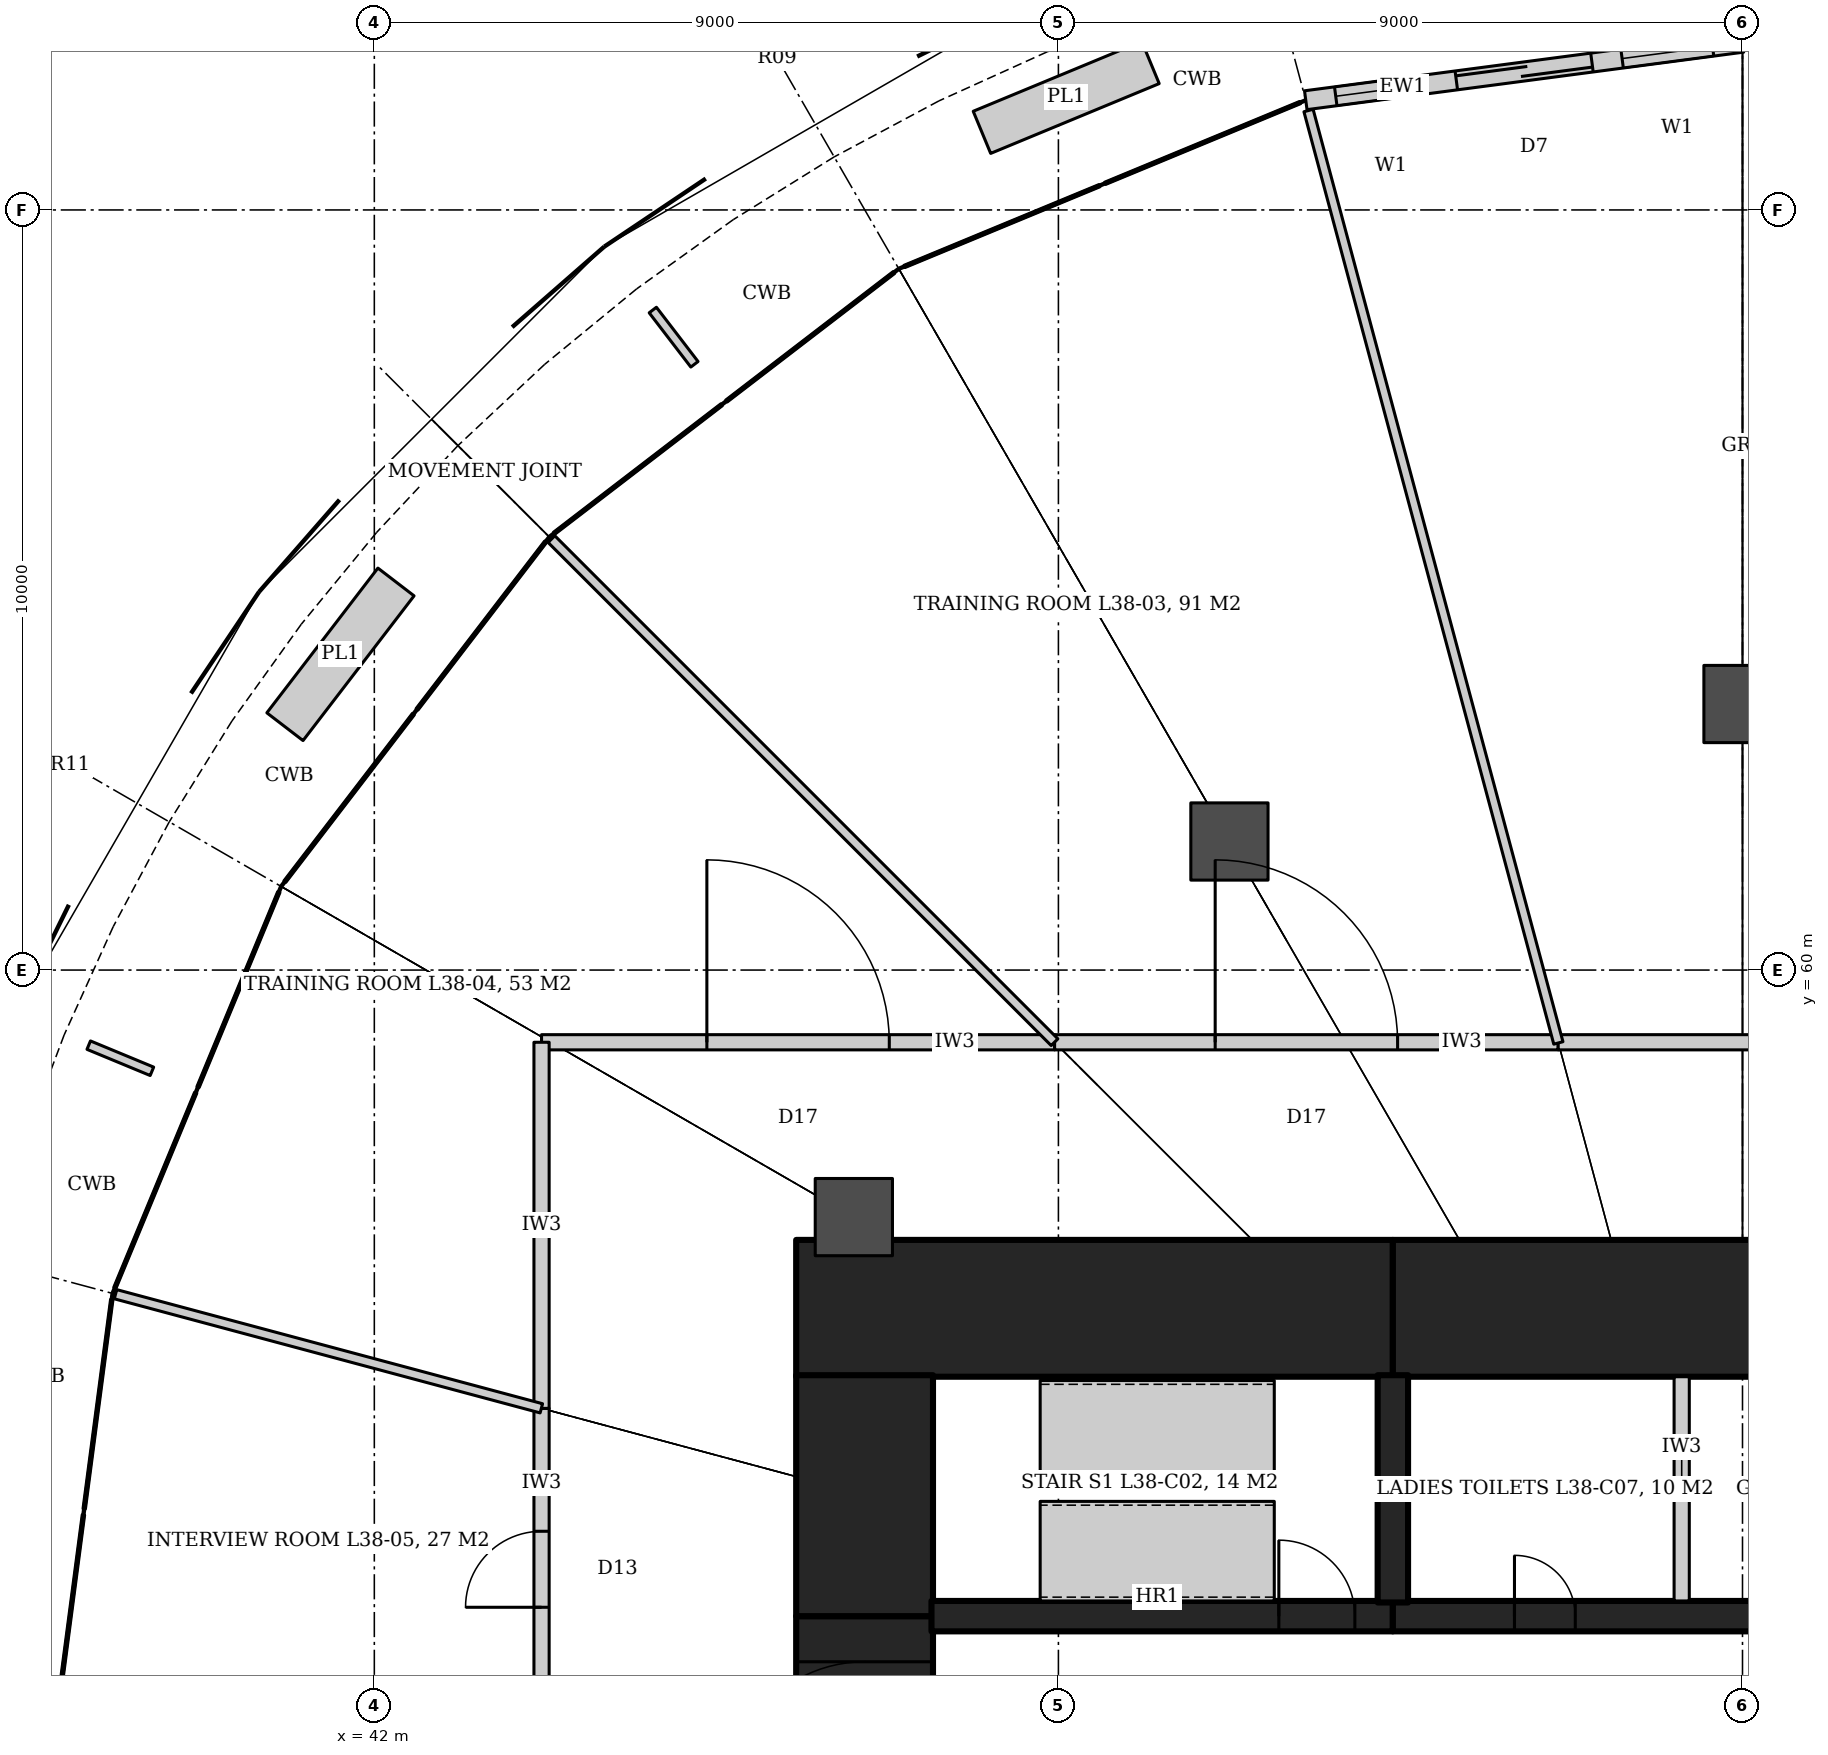
"""IFC4 building model, lengths in metres.
Left out: names, types, materials, properties, quantities, classifications, styles, units other than length and angle.
Written with IfcOpenShell. Run it as: python <this file> out.ifc"""

import sys

from ifc_helpers import new_model, si_unit, direction, frame, frame_2d, origin, origin_2d, place, context, subcontext, project, spatial, rectangle, hollow_circle, extrude, element, fill, save


model = new_model("IFC4")
c1 = context("Model", 3, precision=1e-05, world=origin(), true_north=direction((0.0, 1.0)))
c2 = subcontext(c1, "Body", "Model", "MODEL_VIEW")
j1 = project(units=[si_unit("LENGTHUNIT", "METRE"), si_unit("PLANEANGLEUNIT", "RADIAN")], contexts=[c1])
p1 = place(None, origin())
s1 = spatial("IfcSite", under=j1, at=p1, CompositionType="ELEMENT")
p2 = place(p1, origin())
s2 = spatial("IfcBuilding", under=s1, at=p2, CompositionType="ELEMENT")
p3 = place(p2, frame((0.0, 0.0, 160.4)))
s3 = spatial("IfcBuildingStorey", under=s2, at=p3, CompositionType="ELEMENT", Elevation=160.4)
p4 = place(p3, frame((47.55, 55.55, 0.0), z_axis=(0.0, 0.0, 1.0), x_axis=(1.0, 0.0, 0.0)))
e1 = element("IfcWall", 1, at=p4, inside=s3, PredefinedType="SHEAR", context=c2, shape_type="SweptSolid", body=[
    extrude(rectangle(XDim=7.85, YDim=1.8, at=frame_2d((3.925, 0.0))), origin(), (0.0, 0.0, 1.0), 4.2),
])
p5 = place(p3, frame((55.4, 55.55, 0.0), z_axis=(0.0, 0.0, 1.0), x_axis=(1.0, 0.0, 0.0)))
e2 = element("IfcWall", 2, at=p5, inside=s3, PredefinedType="SHEAR", context=c2, shape_type="SweptSolid", body=[
    extrude(rectangle(XDim=9.2, YDim=1.8, at=frame_2d((4.6, 0.0))), origin(), (0.0, 0.0, 1.0), 4.2),
])
p6 = place(p3, frame((48.45, 48.5, 0.0), z_axis=(0.0, 0.0, 1.0), x_axis=(0.0, 1.0, 0.0)))
e3 = element("IfcWall", 3, at=p6, inside=s3, PredefinedType="SHEAR", context=c2, shape_type="SweptSolid", body=[
    extrude(rectangle(XDim=3.0, YDim=1.8, at=frame_2d((1.5, 0.0))), origin(), (0.0, 0.0, 1.0), 4.2),
])
p7 = place(p6, frame((0.6, 0.0, 0.0)))
e4 = element("IfcOpeningElement", 4, at=p7, cuts=e3, PredefinedType="OPENING", context=c2, shape_type="SweptSolid", body=[
    extrude(rectangle(XDim=1.8, YDim=2.1, at=frame_2d((0.9, 1.05))), frame((0.0, 0.91, 0.0), z_axis=(0.0, -1.0, 0.0), x_axis=(1.0, 0.0, 0.0)), (0.0, 0.0, 1.0), 1.82),
])
p8 = place(p3, frame((48.45, 51.5, 0.0), z_axis=(0.0, 0.0, 1.0), x_axis=(0.0, 1.0, 0.0)))
e5 = element("IfcWall", 5, at=p8, inside=s3, PredefinedType="SHEAR", context=c2, shape_type="SweptSolid", body=[
    extrude(rectangle(XDim=3.17, YDim=1.8, at=frame_2d((1.585, 0.0))), origin(), (0.0, 0.0, 1.0), 4.2),
])
p9 = place(p3, frame((49.33, 51.5, 0.0), z_axis=(0.0, 0.0, 1.0), x_axis=(1.0, 0.0, 0.0)))
e6 = element("IfcWall", 6, at=p9, inside=s3, PredefinedType="SHEAR", context=c2, shape_type="SweptSolid", body=[
    extrude(rectangle(XDim=6.07, YDim=0.4, at=frame_2d((3.035, 0.0))), origin(), (0.0, 0.0, 1.0), 4.2),
])
p10 = place(p9, frame((4.57, 0.0, 0.0)))
e7 = element("IfcOpeningElement", 7, at=p10, cuts=e6, PredefinedType="OPENING", context=c2, shape_type="SweptSolid", body=[
    extrude(rectangle(XDim=1.0, YDim=2.1, at=frame_2d((0.5, 1.05))), frame((0.0, 0.21, 0.0), z_axis=(0.0, -1.0, 0.0), x_axis=(1.0, 0.0, 0.0)), (0.0, 0.0, 1.0), 0.42),
])
p11 = place(p3, frame((55.4, 51.5, 0.0), z_axis=(0.0, 0.0, 1.0), x_axis=(1.0, 0.0, 0.0)))
e8 = element("IfcWall", 8, at=p11, inside=s3, PredefinedType="SHEAR", context=c2, shape_type="SweptSolid", body=[
    extrude(rectangle(XDim=9.2, YDim=0.4, at=frame_2d((4.6, 0.0))), origin(), (0.0, 0.0, 1.0), 4.2),
])
p12 = place(p11, frame((1.6, 0.0, 0.0)))
e9 = element("IfcOpeningElement", 9, at=p12, cuts=e8, PredefinedType="OPENING", context=c2, shape_type="SweptSolid", body=[
    extrude(rectangle(XDim=0.8, YDim=2.1, at=frame_2d((0.4, 1.05))), frame((0.0, 0.21, 0.0), z_axis=(0.0, -1.0, 0.0), x_axis=(1.0, 0.0, 0.0)), (0.0, 0.0, 1.0), 0.42),
])
p13 = place(p11, frame((4.7, 0.0, 0.0)))
e10 = element("IfcOpeningElement", 10, at=p13, cuts=e8, PredefinedType="OPENING", context=c2, shape_type="SweptSolid", body=[
    extrude(rectangle(XDim=0.8, YDim=2.1, at=frame_2d((0.4, 1.05))), frame((0.0, 0.21, 0.0), z_axis=(0.0, -1.0, 0.0), x_axis=(1.0, 0.0, 0.0)), (0.0, 0.0, 1.0), 0.42),
])
p14 = place(p11, frame((7.3, 0.0, 0.0)))
e11 = element("IfcOpeningElement", 11, at=p14, cuts=e8, PredefinedType="OPENING", context=c2, shape_type="SweptSolid", body=[
    extrude(rectangle(XDim=0.8, YDim=2.1, at=frame_2d((0.4, 1.05))), frame((0.0, 0.21, 0.0), z_axis=(0.0, -1.0, 0.0), x_axis=(1.0, 0.0, 0.0)), (0.0, 0.0, 1.0), 0.42),
])
p15 = place(p3, frame((55.4, 51.68, 0.0), z_axis=(0.0, 0.0, 1.0), x_axis=(0.0, 1.0, 0.0)))
e12 = element("IfcWall", 12, at=p15, inside=s3, PredefinedType="SHEAR", context=c2, shape_type="SweptSolid", body=[
    extrude(rectangle(XDim=2.99, YDim=0.4, at=frame_2d((1.495, 0.0))), origin(), (0.0, 0.0, 1.0), 4.2),
])
for number, where, z_axis, x_axis in (
    (13, (60.0, 63.5, 0.0), (0.0, 0.0, 1.0), (1.0, 0.0, 0.0)),
    (14, (53.25, 61.691, 0.0), (0.0, 0.0, 1.0), (1.0, 0.0, 0.0)),
    (15, (48.309, 56.75, 0.0), (0.0, 0.0, 1.0), (1.0, 0.0, 0.0)),
):
    element("IfcColumn", number, at=place(p3, frame(where, z_axis=z_axis, x_axis=x_axis)), inside=s3, PredefinedType="COLUMN", context=c2, shape_type="SweptSolid", body=[
        extrude(hollow_circle(Radius=0.508, WallThickness=0.05, at=origin_2d()), origin(), (0.0, 0.0, 1.0), 4.2),
    ])
p16 = place(p3, frame((44.2, 59.05, 0.0), z_axis=(0.0, 0.0, 1.0), x_axis=(1.0, 0.0, 0.0)))
e16 = element("IfcWall", 16, at=p16, inside=s3, PredefinedType="PARTITIONING", context=c2, shape_type="SweptSolid", body=[
    extrude(rectangle(XDim=6.75, YDim=0.2, at=frame_2d((3.375, 0.0))), origin(), (0.0, 0.0, 1.0), 3.012),
])
p17 = place(p16, frame((2.175, 0.0, 0.0)))
e17 = element("IfcOpeningElement", 17, at=p17, cuts=e16, PredefinedType="OPENING", context=c2, shape_type="SweptSolid", body=[
    extrude(rectangle(XDim=2.4, YDim=2.4, at=frame_2d((1.2, 1.2))), frame((0.0, 0.11, 0.0), z_axis=(0.0, -1.0, 0.0), x_axis=(1.0, 0.0, 0.0)), (0.0, 0.0, 1.0), 0.22),
])
p18 = place(p3, frame((50.95, 59.05, 0.0), z_axis=(0.0, 0.0, 1.0), x_axis=(1.0, 0.0, 0.0)))
e18 = element("IfcWall", 18, at=p18, inside=s3, PredefinedType="PARTITIONING", context=c2, shape_type="SweptSolid", body=[
    extrude(rectangle(XDim=6.625, YDim=0.2, at=frame_2d((3.312, 0.0))), origin(), (0.0, 0.0, 1.0), 3.02),
])
p19 = place(p18, frame((2.113, 0.0, 0.0)))
e19 = element("IfcOpeningElement", 19, at=p19, cuts=e18, PredefinedType="OPENING", context=c2, shape_type="SweptSolid", body=[
    extrude(rectangle(XDim=2.4, YDim=2.4, at=frame_2d((1.2, 1.2))), frame((0.0, 0.11, 0.0), z_axis=(0.0, -1.0, 0.0), x_axis=(1.0, 0.0, 0.0)), (0.0, 0.0, 1.0), 0.22),
])
p20 = place(p3, frame((57.575, 59.05, 0.0), z_axis=(0.0, 0.0, 1.0), x_axis=(1.0, 0.0, 0.0)))
e20 = element("IfcWall", 20, at=p20, inside=s3, PredefinedType="PARTITIONING", context=c2, shape_type="SweptSolid", body=[
    extrude(rectangle(XDim=18.225, YDim=0.2, at=frame_2d((9.112, 0.0))), origin(), (0.0, 0.0, 1.0), 3.012),
])
p21 = place(p20, frame((8.113, 0.0, 0.0)))
e21 = element("IfcOpeningElement", 21, at=p21, cuts=e20, PredefinedType="OPENING", context=c2, shape_type="SweptSolid", body=[
    extrude(rectangle(XDim=2.0, YDim=2.1, at=frame_2d((1.0, 1.05))), frame((0.0, 0.11, 0.0), z_axis=(0.0, -1.0, 0.0), x_axis=(1.0, 0.0, 0.0)), (0.0, 0.0, 1.0), 0.22),
])
p22 = place(p3, frame((44.2, 50.0, 0.0), z_axis=(0.0, 0.0, 1.0), x_axis=(0.0, 1.0, 0.0)))
e22 = element("IfcWall", 22, at=p22, inside=s3, PredefinedType="PARTITIONING", context=c2, shape_type="SweptSolid", body=[
    extrude(rectangle(XDim=4.234, YDim=0.2, at=frame_2d((2.117, 0.0))), origin(), (0.0, 0.0, 1.0), 3.012),
])
p23 = place(p22, frame((1.617, 0.0, 0.0)))
e23 = element("IfcOpeningElement", 23, at=p23, cuts=e22, PredefinedType="OPENING", context=c2, shape_type="SweptSolid", body=[
    extrude(rectangle(XDim=1.0, YDim=2.4, at=frame_2d((0.5, 1.2))), frame((0.0, 0.11, 0.0), z_axis=(0.0, -1.0, 0.0), x_axis=(1.0, 0.0, 0.0)), (0.0, 0.0, 1.0), 0.22),
])
p24 = place(p3, frame((44.2, 54.234, 0.0), z_axis=(0.0, 0.0, 1.0), x_axis=(0.0, 1.0, 0.0)))
e24 = element("IfcWall", 24, at=p24, inside=s3, PredefinedType="PARTITIONING", context=c2, shape_type="SweptSolid", body=[
    extrude(rectangle(XDim=4.816, YDim=0.2, at=frame_2d((2.408, 0.0))), origin(), (0.0, 0.0, 1.0), 3.012),
])
p25 = place(p3, frame((57.577, 59.041, 0.0), z_axis=(0.0, 0.0, 1.0), x_axis=(-0.258810449587, 0.96592812941, 0.0)))
e25 = element("IfcWall", 25, at=p25, inside=s3, PredefinedType="PARTITIONING", context=c2, shape_type="SweptSolid", body=[
    extrude(rectangle(XDim=12.8, YDim=0.125, at=frame_2d((6.4, 0.0))), origin(), (0.0, 0.0, 1.0), 3.012),
])
p26 = place(p3, frame((50.949, 59.051, 0.0), z_axis=(0.0, 0.0, 1.0), x_axis=(-0.707106781187, 0.707106781187, 0.0)))
e26 = element("IfcWall", 26, at=p26, inside=s3, PredefinedType="PARTITIONING", context=c2, shape_type="SweptSolid", body=[
    extrude(rectangle(XDim=5.86, YDim=0.125, at=frame_2d((2.93, 0.0))), origin(), (0.0, 0.0, 1.0), 3.012),
])
p27 = place(p3, frame((44.198, 54.234, 0.0), z_axis=(0.0, 0.0, 1.0), x_axis=(-0.965933460469, 0.258790552276, 0.0)))
e27 = element("IfcWall", 27, at=p27, inside=s3, PredefinedType="PARTITIONING", context=c2, shape_type="SweptSolid", body=[
    extrude(rectangle(XDim=5.9, YDim=0.125, at=frame_2d((2.95, 0.0))), origin(), (0.0, 0.0, 1.0), 3.012),
])
p28 = place(p3, frame((60.0, 72.3, 0.0), z_axis=(0.0, 0.0, 1.0), x_axis=(-0.99144158687, -0.130551062135, 0.0)))
e28 = element("IfcWall", 28, at=p28, inside=s3, PredefinedType="SOLIDWALL", context=c2, shape_type="SweptSolid", body=[
    extrude(rectangle(XDim=5.822, YDim=0.25, at=frame_2d((2.911, 0.0))), origin(), (0.0, 0.0, 1.0), 4.04),
])
p29 = place(p28, frame((2.011, 0.0, 0.0)))
e29 = element("IfcOpeningElement", 29, at=p29, cuts=e28, PredefinedType="OPENING", context=c2, shape_type="SweptSolid", body=[
    extrude(rectangle(XDim=1.8, YDim=2.4, at=frame_2d((0.9, 1.2))), frame((0.0, 0.135, 0.0), z_axis=(0.0, -1.0, 0.0), x_axis=(1.0, 0.0, 0.0)), (0.0, 0.0, 1.0), 0.27),
])
p30 = place(p28, frame((0.411, 0.0, 0.0)))
e30 = element("IfcOpeningElement", 30, at=p30, cuts=e28, PredefinedType="OPENING", context=c2, shape_type="SweptSolid", body=[
    extrude(rectangle(XDim=1.2, YDim=2.4, at=frame_2d((0.6, 1.2))), frame((0.0, 0.135, 0.0), z_axis=(0.0, -1.0, 0.0), x_axis=(1.0, 0.0, 0.0)), (0.0, 0.0, 1.0), 0.27),
])
p31 = place(p28, frame((4.211, 0.0, 0.0)))
e31 = element("IfcOpeningElement", 31, at=p31, cuts=e28, PredefinedType="OPENING", context=c2, shape_type="SweptSolid", body=[
    extrude(rectangle(XDim=1.2, YDim=2.4, at=frame_2d((0.6, 1.2))), frame((0.0, 0.135, 0.0), z_axis=(0.0, -1.0, 0.0), x_axis=(1.0, 0.0, 0.0)), (0.0, 0.0, 1.0), 0.27),
])
p32 = place(p3, frame((59.2, 51.7, 0.0), z_axis=(0.0, 0.0, 1.0), x_axis=(0.0, 1.0, 0.0)))
e32 = element("IfcWall", 32, at=p32, inside=s3, PredefinedType="PARTITIONING", context=c2, shape_type="SweptSolid", body=[
    extrude(rectangle(XDim=2.95, YDim=0.2, at=frame_2d((1.475, 0.0))), origin(), (0.0, 0.0, 1.0), 4.04),
])
p33 = place(p19, origin())
e33 = element("IfcDoor", 33, at=p33, inside=s3, OperationType="DOUBLE_DOOR_DOUBLE_SWING", PredefinedType="DOOR", context=c2, shape_type="SweptSolid", body=[
    extrude(rectangle(XDim=2.4, YDim=2.4, at=frame_2d((1.2, 1.2))), frame((0.0, 0.025, 0.0), z_axis=(0.0, -1.0, 0.0), x_axis=(1.0, 0.0, 0.0)), (0.0, 0.0, 1.0), 0.05),
])
fill(e19, e33)
p34 = place(p17, origin())
e34 = element("IfcDoor", 34, at=p34, inside=s3, OperationType="DOUBLE_DOOR_DOUBLE_SWING", PredefinedType="DOOR", context=c2, shape_type="SweptSolid", body=[
    extrude(rectangle(XDim=2.4, YDim=2.4, at=frame_2d((1.2, 1.2))), frame((0.0, 0.025, 0.0), z_axis=(0.0, -1.0, 0.0), x_axis=(1.0, 0.0, 0.0)), (0.0, 0.0, 1.0), 0.05),
])
fill(e17, e34)
p35 = place(p23, origin())
e35 = element("IfcDoor", 35, at=p35, inside=s3, OperationType="SINGLE_SWING_LEFT", PredefinedType="DOOR", context=c2, shape_type="SweptSolid", body=[
    extrude(rectangle(XDim=1.0, YDim=2.4, at=frame_2d((0.5, 1.2))), frame((0.0, 0.025, 0.0), z_axis=(0.0, -1.0, 0.0), x_axis=(1.0, 0.0, 0.0)), (0.0, 0.0, 1.0), 0.05),
])
fill(e23, e35)
p36 = place(p29, origin())
e36 = element("IfcDoor", 36, at=p36, inside=s3, OperationType="DOUBLE_DOOR_SLIDING", PredefinedType="DOOR", context=c2, shape_type="SweptSolid", body=[
    extrude(rectangle(XDim=1.8, YDim=2.4, at=frame_2d((0.9, 1.2))), frame((0.0, 0.025, 0.0), z_axis=(0.0, -1.0, 0.0), x_axis=(1.0, 0.0, 0.0)), (0.0, 0.0, 1.0), 0.05),
])
fill(e29, e36)
p37 = place(p30, origin())
e37 = element("IfcWindow", 37, at=p37, inside=s3, PartitioningType="SINGLE_PANEL", PredefinedType="WINDOW", context=c2, shape_type="SweptSolid", body=[
    extrude(rectangle(XDim=1.2, YDim=2.4, at=frame_2d((0.6, 1.2))), frame((0.0, 0.03, 0.0), z_axis=(0.0, -1.0, 0.0), x_axis=(1.0, 0.0, 0.0)), (0.0, 0.0, 1.0), 0.06),
])
fill(e30, e37)
p38 = place(p31, origin())
e38 = element("IfcWindow", 38, at=p38, inside=s3, PartitioningType="SINGLE_PANEL", PredefinedType="WINDOW", context=c2, shape_type="SweptSolid", body=[
    extrude(rectangle(XDim=1.2, YDim=2.4, at=frame_2d((0.6, 1.2))), frame((0.0, 0.03, 0.0), z_axis=(0.0, -1.0, 0.0), x_axis=(1.0, 0.0, 0.0)), (0.0, 0.0, 1.0), 0.06),
])
fill(e31, e38)
p39 = place(p10, origin())
e39 = element("IfcDoor", 39, at=p39, inside=s3, OperationType="SINGLE_SWING_LEFT", PredefinedType="DOOR", context=c2, shape_type="SweptSolid", body=[
    extrude(rectangle(XDim=1.0, YDim=2.1, at=frame_2d((0.5, 1.05))), frame((0.0, 0.025, 0.0), z_axis=(0.0, -1.0, 0.0), x_axis=(1.0, 0.0, 0.0)), (0.0, 0.0, 1.0), 0.05),
])
fill(e7, e39)
p40 = place(p7, origin())
e40 = element("IfcDoor", 40, at=p40, inside=s3, OperationType="DOUBLE_DOOR_DOUBLE_SWING", PredefinedType="DOOR", context=c2, shape_type="SweptSolid", body=[
    extrude(rectangle(XDim=1.8, YDim=2.1, at=frame_2d((0.9, 1.05))), frame((0.0, 0.025, 0.0), z_axis=(0.0, -1.0, 0.0), x_axis=(1.0, 0.0, 0.0)), (0.0, 0.0, 1.0), 0.05),
])
fill(e4, e40)
p41 = place(p12, origin())
e41 = element("IfcDoor", 41, at=p41, inside=s3, OperationType="SINGLE_SWING_LEFT", PredefinedType="DOOR", context=c2, shape_type="SweptSolid", body=[
    extrude(rectangle(XDim=0.8, YDim=2.1, at=frame_2d((0.4, 1.05))), frame((0.0, 0.025, 0.0), z_axis=(0.0, -1.0, 0.0), x_axis=(1.0, 0.0, 0.0)), (0.0, 0.0, 1.0), 0.05),
])
fill(e9, e41)
save(model, sys.argv[1])
